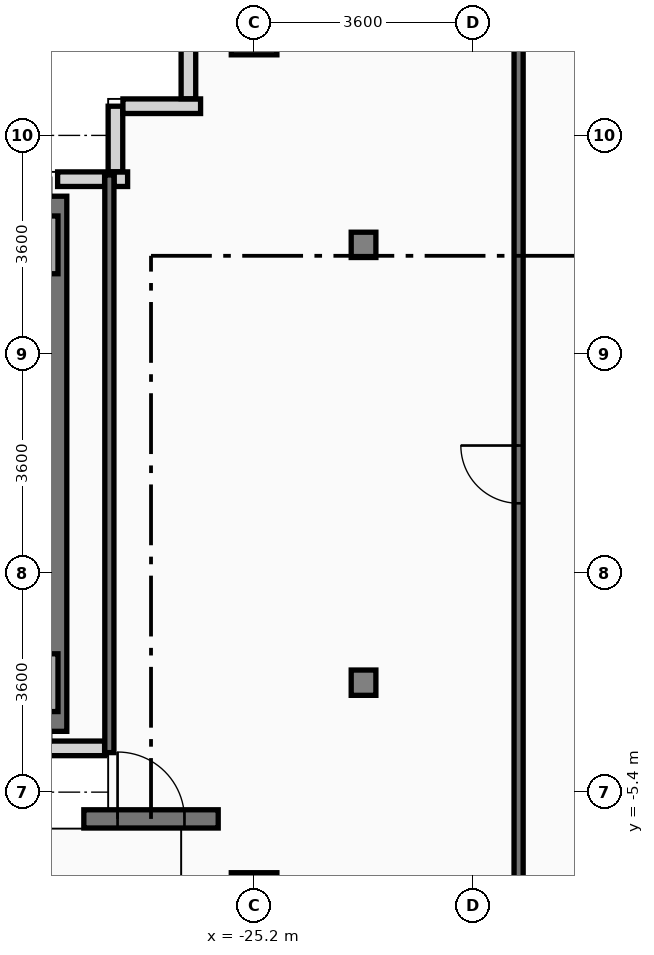
"""IFC4 building model, lengths in metres.
Left out: names, types, materials, properties, quantities, classifications, styles, units other than length and angle.
Written with IfcOpenShell. Run it as: python <this file> out.ifc"""

import sys

from ifc_helpers import new_model, si_unit, direction, frame, frame_2d, origin, origin_2d, place, context, subcontext, project, spatial, rectangle, i_section, extrude, source, transform, mapped, element, fill, save


model = new_model("IFC4")
c1 = context("Model", 3, precision=1e-05, world=origin(), true_north=direction((0.0, 1.0)))
c2 = subcontext(c1, "Body", "Model", "MODEL_VIEW")
j1 = project(units=[si_unit("LENGTHUNIT", "METRE"), si_unit("PLANEANGLEUNIT", "RADIAN")], contexts=[c1])
p1 = place(None, origin())
s1 = spatial("IfcSite", under=j1, at=p1, CompositionType="ELEMENT")
p2 = place(p1, origin())
s2 = spatial("IfcBuilding", under=s1, at=p2, CompositionType="ELEMENT")
p3 = place(p2, frame((0.0, 0.0, 25.2)))
s3 = spatial("IfcBuildingStorey", under=s2, at=p3, CompositionType="ELEMENT", Elevation=25.2)
m1 = source(origin(), c2, "Body", "SweptSolid", [
    extrude(rectangle(XDim=0.75, YDim=0.95, at=origin_2d()), origin(), (0.0, 0.0, 1.0), 5.2),
])
for number, where, z_axis, x_axis in (
    (1, (-28.8, -3.6, 0.0), (0.0, 0.0, 1.0), (1.0, 0.0, 0.0)),
    (2, (-28.8, 3.6, 0.0), (0.0, 0.0, 1.0), (1.0, 0.0, 0.0)),
    (3, (-25.2, -7.2, 0.0), (0.0, 0.0, 1.0), (1.0, 0.0, 0.0)),
    (4, (-25.2, 7.2, 0.0), (0.0, 0.0, 1.0), (1.0, 0.0, 0.0)),
):
    element("IfcColumn", number, at=place(p3, frame(where, z_axis=z_axis, x_axis=x_axis)), inside=s3, PredefinedType="COLUMN", context=c2, shape_type="MappedRepresentation", body=[
        mapped(m1, transform((0.0, 0.0, 0.0), x_axis=(1.0, 0.0, 0.0), y_axis=(0.0, 1.0, 0.0), z_axis=(0.0, 0.0, 1.0), scale=1.0)),
    ])
m2 = source(origin(), c2, "Body", "SweptSolid", [
    extrude(i_section(OverallWidth=0.406, OverallDepth=0.416, WebThickness=0.024, FlangeThickness=0.039, at=origin_2d()), origin(), (0.0, 0.0, 1.0), 5.2),
])
for number, where, z_axis, x_axis in (
    (5, (-23.4, -3.6, 0.0), (0.0, 0.0, 1.0), (1.0, 0.0, 0.0)),
    (6, (-23.4, 3.6, 0.0), (0.0, 0.0, 1.0), (1.0, 0.0, 0.0)),
):
    element("IfcColumn", number, at=place(p3, frame(where, z_axis=z_axis, x_axis=x_axis)), inside=s3, PredefinedType="COLUMN", context=c2, shape_type="MappedRepresentation", body=[
        mapped(m2, transform((0.0, 0.0, 0.0), x_axis=(1.0, 0.0, 0.0), y_axis=(0.0, 1.0, 0.0), z_axis=(0.0, 0.0, 1.0), scale=1.0)),
    ])
p4 = place(p3, frame((-28.45, -4.4, 0.0), z_axis=(0.0, 0.0, 1.0), x_axis=(0.0, 1.0, 0.0)))
e7 = element("IfcWall", 7, at=p4, inside=s3, PredefinedType="SOLIDWALL", context=c2, shape_type="SweptSolid", body=[
    extrude(rectangle(XDim=8.8, YDim=0.34, at=frame_2d((4.4, 0.0))), origin(), (0.0, 0.0, 1.0), 4.386),
])
p5 = place(p3, frame((-28.0, -5.84, 0.0), z_axis=(0.0, 0.0, 1.0), x_axis=(1.0, 0.0, 0.0)))
e8 = element("IfcWall", 8, at=p5, inside=s3, PredefinedType="SOLIDWALL", context=c2, shape_type="SweptSolid", body=[
    extrude(rectangle(XDim=2.21, YDim=0.3, at=frame_2d((1.105, 0.0))), origin(), (0.0, 0.0, 1.0), 3.4),
])
p6 = place(p5, frame((0.555, 0.0, 0.0)))
e9 = element("IfcOpeningElement", 9, at=p6, cuts=e8, PredefinedType="OPENING", context=c2, shape_type="SweptSolid", body=[
    extrude(rectangle(XDim=1.1, YDim=2.3, at=frame_2d((0.55, 1.15))), frame((0.0, 0.16, 0.0), z_axis=(0.0, -1.0, 0.0), x_axis=(1.0, 0.0, 0.0)), (0.0, 0.0, 1.0), 0.32),
])
p7 = place(p3, frame((-27.658, -4.68, 0.0), z_axis=(0.0, 0.0, 1.0), x_axis=(-1.0, 0.0, 0.0)))
e10 = element("IfcWall", 10, at=p7, inside=s3, PredefinedType="PARAPET", context=c2, shape_type="SweptSolid", body=[
    extrude(rectangle(XDim=1.022, YDim=0.24, at=frame_2d((0.511, 0.0))), origin(), (0.0, 0.0, 1.0), 1.15),
])
p8 = place(p3, frame((-28.431, 4.68, 0.0), z_axis=(0.0, 0.0, 1.0), x_axis=(1.0, 0.0, 0.0)))
e11 = element("IfcWall", 11, at=p8, inside=s3, PredefinedType="PARAPET", context=c2, shape_type="SweptSolid", body=[
    extrude(rectangle(XDim=0.773, YDim=0.24, at=frame_2d((0.387, 0.0))), origin(), (0.0, 0.0, 1.0), 1.15),
])
p9 = place(p3, frame((-27.502, 4.68, 0.0), z_axis=(0.0, 0.0, 1.0), x_axis=(1.0, 0.0, 0.0)))
e12 = element("IfcWall", 12, at=p9, inside=s3, PredefinedType="PARAPET", context=c2, shape_type="SweptSolid", body=[
    extrude(rectangle(XDim=0.222, YDim=0.24, at=frame_2d((0.111, 0.0))), origin(), (0.0, 0.0, 1.0), 1.15),
])
p10 = place(p3, frame((-27.48, 4.803, 0.0), z_axis=(0.0, 0.0, 1.0), x_axis=(0.0, 1.0, 0.0)))
e13 = element("IfcWall", 13, at=p10, inside=s3, PredefinedType="PARAPET", context=c2, shape_type="SweptSolid", body=[
    extrude(rectangle(XDim=1.077, YDim=0.24, at=frame_2d((0.539, 0.0))), origin(), (0.0, 0.0, 1.0), 1.15),
])
p11 = place(p3, frame((-27.357, 5.88, 0.0), z_axis=(0.0, 0.0, 1.0), x_axis=(1.0, 0.0, 0.0)))
e14 = element("IfcWall", 14, at=p11, inside=s3, PredefinedType="PARAPET", context=c2, shape_type="SweptSolid", body=[
    extrude(rectangle(XDim=1.277, YDim=0.24, at=frame_2d((0.638, 0.0))), origin(), (0.0, 0.0, 1.0), 1.15),
])
p12 = place(p3, frame((-26.28, 6.003, 0.0), z_axis=(0.0, 0.0, 1.0), x_axis=(0.0, 1.0, 0.0)))
e15 = element("IfcWall", 15, at=p12, inside=s3, PredefinedType="PARAPET", context=c2, shape_type="SweptSolid", body=[
    extrude(rectangle(XDim=1.077, YDim=0.24, at=frame_2d((0.539, 0.0))), origin(), (0.0, 0.0, 1.0), 1.15),
])
p13 = place(p3, frame((-27.58, -4.75, 0.0), z_axis=(0.0, 0.0, 1.0), x_axis=(0.0, 1.0, 0.0)))
e16 = element("IfcWall", 16, at=p13, inside=s3, PredefinedType="PARTITIONING", context=c2, shape_type="SweptSolid", body=[
    extrude(rectangle(XDim=9.5, YDim=0.15, at=frame_2d((4.75, 0.0))), origin(), (0.0, 0.0, 1.0), 4.386),
])
p14 = place(p3, frame((-20.85, -6.85, 0.0), z_axis=(0.0, 0.0, 1.0), x_axis=(0.0, 1.0, 0.0)))
e17 = element("IfcWall", 17, at=p14, inside=s3, PredefinedType="PARTITIONING", context=c2, shape_type="SweptSolid", body=[
    extrude(rectangle(XDim=13.7, YDim=0.15, at=frame_2d((6.85, 0.0))), origin(), (0.0, 0.0, 1.0), 3.4),
])
p15 = place(p14, frame((6.2, 0.0, 0.0)))
e18 = element("IfcOpeningElement", 18, at=p15, cuts=e17, PredefinedType="OPENING", context=c2, shape_type="SweptSolid", body=[
    extrude(rectangle(XDim=0.95, YDim=2.15, at=frame_2d((0.475, 1.075))), frame((0.0, 0.085, 0.0), z_axis=(0.0, -1.0, 0.0), x_axis=(1.0, 0.0, 0.0)), (0.0, 0.0, 1.0), 0.17),
])
m3 = source(origin(), c2, "Body", "SweptSolid", [
    extrude(rectangle(XDim=1.1, YDim=2.3, at=frame_2d((0.55, 1.15))), frame((0.0, 0.025, 0.0), z_axis=(0.0, -1.0, 0.0), x_axis=(1.0, 0.0, 0.0)), (0.0, 0.0, 1.0), 0.05),
])
p16 = place(p6, frame((1.1, 0.0, 0.0), z_axis=(0.0, 0.0, 1.0), x_axis=(-1.0, 0.0, 0.0)))
e19 = element("IfcDoor", 19, at=p16, inside=s3, OperationType="SINGLE_SWING_LEFT", PredefinedType="DOOR", context=c2, shape_type="MappedRepresentation", body=[
    mapped(m3, transform((0.0, 0.0, 0.0), x_axis=(1.0, 0.0, 0.0), y_axis=(0.0, 1.0, 0.0), z_axis=(0.0, 0.0, 1.0), scale=1.0)),
])
fill(e9, e19)
m4 = source(origin(), c2, "Body", "SweptSolid", [
    extrude(rectangle(XDim=0.95, YDim=2.15, at=frame_2d((0.475, 1.075))), frame((0.0, 0.025, 0.0), z_axis=(0.0, -1.0, 0.0), x_axis=(1.0, 0.0, 0.0)), (0.0, 0.0, 1.0), 0.05),
])
p17 = place(p15, origin())
e20 = element("IfcDoor", 20, at=p17, inside=s3, OperationType="SINGLE_SWING_RIGHT", PredefinedType="DOOR", context=c2, shape_type="MappedRepresentation", body=[
    mapped(m4, transform((0.0, 0.0, 0.0), x_axis=(1.0, 0.0, 0.0), y_axis=(0.0, 1.0, 0.0), z_axis=(0.0, 0.0, 1.0), scale=1.0)),
])
fill(e18, e20)
save(model, sys.argv[1])
